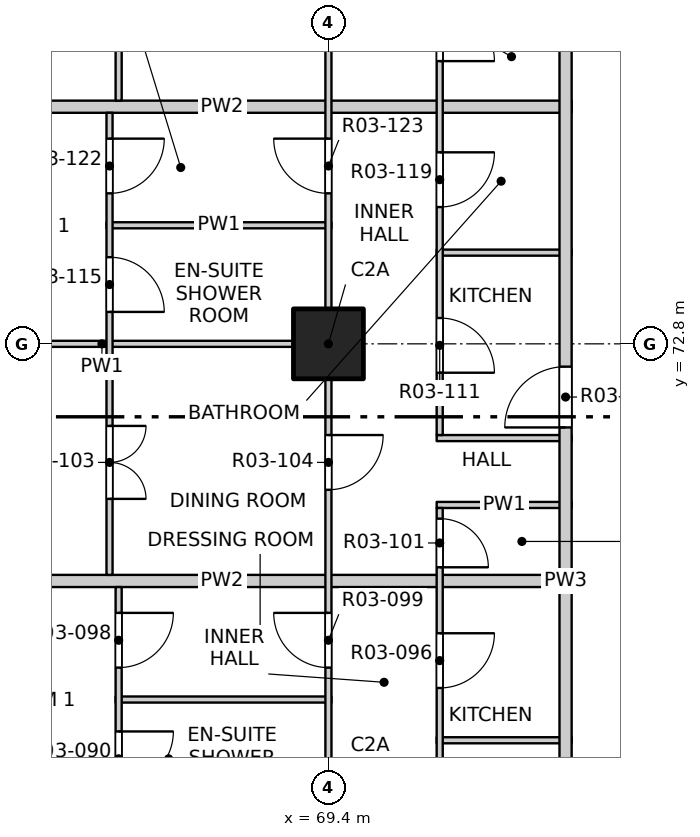
"""IFC4 building model, lengths in metres.
Left out: names, types, materials, properties, quantities, classifications, styles, units other than length and angle.
Written with IfcOpenShell. Run it as: python <this file> out.ifc"""

import sys

from ifc_helpers import new_model, si_unit, direction, frame, frame_2d, origin, origin_2d, place, context, subcontext, project, spatial, rectangle, extrude, element, fill, save


model = new_model("IFC4")
c1 = context("Model", 3, precision=1e-05, world=origin(), true_north=direction((0.0, 1.0)))
c2 = subcontext(c1, "Body", "Model", "MODEL_VIEW")
j1 = project(units=[si_unit("LENGTHUNIT", "METRE"), si_unit("PLANEANGLEUNIT", "RADIAN")], contexts=[c1])
p1 = place(None, origin())
s1 = spatial("IfcSite", under=j1, at=p1, CompositionType="ELEMENT")
p2 = place(p1, origin())
s2 = spatial("IfcBuilding", under=s1, at=p2, CompositionType="ELEMENT")
p3 = place(p2, frame((0.0, 0.0, 43.3)))
s3 = spatial("IfcBuildingStorey", under=s2, at=p3, CompositionType="ELEMENT", Elevation=43.3)
p4 = place(p3, frame((69.4, 72.8, -0.25), z_axis=(0.0, 0.0, 1.0), x_axis=(1.0, 0.0, 0.0)))
e1 = element("IfcColumn", 1, at=p4, inside=s3, PredefinedType="COLUMN", context=c2, shape_type="SweptSolid", body=[
    extrude(rectangle(XDim=1.15, YDim=1.15, at=origin_2d()), origin(), (0.0, 0.0, 1.0), 3.35),
])
p5 = place(p3, frame((71.18, 66.28, 0.0), z_axis=(0.0, 0.0, 1.0), x_axis=(1.0, 0.0, 0.0)))
e2 = element("IfcWall", 2, at=p5, inside=s3, PredefinedType="PARTITIONING", context=c2, shape_type="SweptSolid", body=[
    extrude(rectangle(XDim=2.22, YDim=0.1, at=frame_2d((1.11, 0.0))), origin(), (0.0, 0.0, 1.0), 3.1),
])
p6 = place(p3, frame((65.9, 66.95, 0.0), z_axis=(0.0, 0.0, 1.0), x_axis=(1.0, 0.0, 0.0)))
e3 = element("IfcWall", 3, at=p6, inside=s3, PredefinedType="PARTITIONING", context=c2, shape_type="SweptSolid", body=[
    extrude(rectangle(XDim=3.55, YDim=0.1, at=frame_2d((1.775, 0.0))), origin(), (0.0, 0.0, 1.0), 3.1),
])
p7 = place(p3, frame((61.9, 68.9, 0.0), z_axis=(0.0, 0.0, 1.0), x_axis=(1.0, 0.0, 0.0)))
e4 = element("IfcWall", 4, at=p7, inside=s3, PredefinedType="PARTITIONING", context=c2, shape_type="SweptSolid", body=[
    extrude(rectangle(XDim=11.5, YDim=0.2, at=frame_2d((5.75, 0.0))), origin(), (0.0, 0.0, 1.0), 3.1),
])
for number, where, z_axis, x_axis in (
    (5, (71.18, 70.15, 0.0), (0.0, 0.0, 1.0), (1.0, 0.0, 0.0)),
    (6, (71.18, 71.25, 0.0), (0.0, 0.0, 1.0), (1.0, 0.0, 0.0)),
):
    element("IfcWall", number, at=place(p3, frame(where, z_axis=z_axis, x_axis=x_axis)), inside=s3, PredefinedType="PARTITIONING", context=c2, shape_type="SweptSolid", body=[
        extrude(rectangle(XDim=2.22, YDim=0.1, at=frame_2d((1.11, 0.0))), origin(), (0.0, 0.0, 1.0), 3.1),
    ])
p8 = place(p3, frame((61.9, 72.8, 0.0), z_axis=(0.0, 0.0, 1.0), x_axis=(1.0, 0.0, 0.0)))
e7 = element("IfcWall", 7, at=p8, inside=s3, PredefinedType="PARTITIONING", context=c2, shape_type="SweptSolid", body=[
    extrude(rectangle(XDim=7.55, YDim=0.1, at=frame_2d((3.775, 0.0))), origin(), (0.0, 0.0, 1.0), 3.1),
])
p9 = place(p3, frame((71.18, 74.3, 0.0), z_axis=(0.0, 0.0, 1.0), x_axis=(1.0, 0.0, 0.0)))
e8 = element("IfcWall", 8, at=p9, inside=s3, PredefinedType="PARTITIONING", context=c2, shape_type="SweptSolid", body=[
    extrude(rectangle(XDim=2.22, YDim=0.1, at=frame_2d((1.11, 0.0))), origin(), (0.0, 0.0, 1.0), 3.1),
])
p10 = place(p3, frame((65.75, 74.75, 0.0), z_axis=(0.0, 0.0, 1.0), x_axis=(1.0, 0.0, 0.0)))
e9 = element("IfcWall", 9, at=p10, inside=s3, PredefinedType="PARTITIONING", context=c2, shape_type="SweptSolid", body=[
    extrude(rectangle(XDim=3.7, YDim=0.1, at=frame_2d((1.85, 0.0))), origin(), (0.0, 0.0, 1.0), 3.1),
])
p11 = place(p3, frame((61.9, 76.7, 0.0), z_axis=(0.0, 0.0, 1.0), x_axis=(1.0, 0.0, 0.0)))
e10 = element("IfcWall", 10, at=p11, inside=s3, PredefinedType="PARTITIONING", context=c2, shape_type="SweptSolid", body=[
    extrude(rectangle(XDim=11.5, YDim=0.2, at=frame_2d((5.75, 0.0))), origin(), (0.0, 0.0, 1.0), 3.1),
])
p12 = place(p3, frame((65.8, 69.0, 0.0), z_axis=(0.0, 0.0, 1.0), x_axis=(0.0, 1.0, 0.0)))
e11 = element("IfcWall", 11, at=p12, inside=s3, PredefinedType="PARTITIONING", context=c2, shape_type="SweptSolid", body=[
    extrude(rectangle(XDim=7.6, YDim=0.1, at=frame_2d((3.8, 0.0))), origin(), (0.0, 0.0, 1.0), 3.1),
])
p13 = place(p12, frame((1.25, 0.0, 0.0)))
e12 = element("IfcOpeningElement", 12, at=p13, cuts=e11, PredefinedType="OPENING", context=c2, shape_type="SweptSolid", body=[
    extrude(rectangle(XDim=1.2, YDim=2.1, at=frame_2d((0.6, 1.05))), frame((0.0, 0.06, 0.0), z_axis=(0.0, -1.0, 0.0), x_axis=(1.0, 0.0, 0.0)), (0.0, 0.0, 1.0), 0.12),
])
p14 = place(p12, frame((4.325, 0.0, 0.0)))
e13 = element("IfcOpeningElement", 13, at=p14, cuts=e11, PredefinedType="OPENING", context=c2, shape_type="SweptSolid", body=[
    extrude(rectangle(XDim=0.9, YDim=2.1, at=frame_2d((0.45, 1.05))), frame((0.0, 0.06, 0.0), z_axis=(0.0, -1.0, 0.0), x_axis=(1.0, 0.0, 0.0)), (0.0, 0.0, 1.0), 0.12),
])
p15 = place(p12, frame((6.275, 0.0, 0.0)))
e14 = element("IfcOpeningElement", 14, at=p15, cuts=e11, PredefinedType="OPENING", context=c2, shape_type="SweptSolid", body=[
    extrude(rectangle(XDim=0.9, YDim=2.1, at=frame_2d((0.45, 1.05))), frame((0.0, 0.06, 0.0), z_axis=(0.0, -1.0, 0.0), x_axis=(1.0, 0.0, 0.0)), (0.0, 0.0, 1.0), 0.12),
])
p16 = place(p3, frame((65.95, 61.2, 0.0), z_axis=(0.0, 0.0, 1.0), x_axis=(0.0, 1.0, 0.0)))
e15 = element("IfcWall", 15, at=p16, inside=s3, PredefinedType="PARTITIONING", context=c2, shape_type="SweptSolid", body=[
    extrude(rectangle(XDim=7.6, YDim=0.1, at=frame_2d((3.8, 0.0))), origin(), (0.0, 0.0, 1.0), 3.1),
])
p17 = place(p16, frame((1.25, 0.0, 0.0)))
e16 = element("IfcOpeningElement", 16, at=p17, cuts=e15, PredefinedType="OPENING", context=c2, shape_type="SweptSolid", body=[
    extrude(rectangle(XDim=1.2, YDim=2.1, at=frame_2d((0.6, 1.05))), frame((0.0, 0.06, 0.0), z_axis=(0.0, -1.0, 0.0), x_axis=(1.0, 0.0, 0.0)), (0.0, 0.0, 1.0), 0.12),
])
p18 = place(p16, frame((4.325, 0.0, 0.0)))
e17 = element("IfcOpeningElement", 17, at=p18, cuts=e15, PredefinedType="OPENING", context=c2, shape_type="SweptSolid", body=[
    extrude(rectangle(XDim=0.9, YDim=2.1, at=frame_2d((0.45, 1.05))), frame((0.0, 0.06, 0.0), z_axis=(0.0, -1.0, 0.0), x_axis=(1.0, 0.0, 0.0)), (0.0, 0.0, 1.0), 0.12),
])
p19 = place(p16, frame((6.275, 0.0, 0.0)))
e18 = element("IfcOpeningElement", 18, at=p19, cuts=e15, PredefinedType="OPENING", context=c2, shape_type="SweptSolid", body=[
    extrude(rectangle(XDim=0.9, YDim=2.1, at=frame_2d((0.45, 1.05))), frame((0.0, 0.06, 0.0), z_axis=(0.0, -1.0, 0.0), x_axis=(1.0, 0.0, 0.0)), (0.0, 0.0, 1.0), 0.12),
])
p20 = place(p3, frame((65.95, 76.8, 0.0), z_axis=(0.0, 0.0, 1.0), x_axis=(0.0, 1.0, 0.0)))
e19 = element("IfcWall", 19, at=p20, inside=s3, PredefinedType="PARTITIONING", context=c2, shape_type="SweptSolid", body=[
    extrude(rectangle(XDim=11.3, YDim=0.1, at=frame_2d((5.65, 0.0))), origin(), (0.0, 0.0, 1.0), 3.1),
])
p21 = place(p20, frame((1.25, 0.0, 0.0)))
e20 = element("IfcOpeningElement", 20, at=p21, cuts=e19, PredefinedType="OPENING", context=c2, shape_type="SweptSolid", body=[
    extrude(rectangle(XDim=1.2, YDim=2.1, at=frame_2d((0.6, 1.05))), frame((0.0, 0.06, 0.0), z_axis=(0.0, -1.0, 0.0), x_axis=(1.0, 0.0, 0.0)), (0.0, 0.0, 1.0), 0.12),
])
p22 = place(p20, frame((5.15, 0.0, 0.0)))
e21 = element("IfcOpeningElement", 21, at=p22, cuts=e19, PredefinedType="OPENING", context=c2, shape_type="SweptSolid", body=[
    extrude(rectangle(XDim=1.2, YDim=2.1, at=frame_2d((0.6, 1.05))), frame((0.0, 0.06, 0.0), z_axis=(0.0, -1.0, 0.0), x_axis=(1.0, 0.0, 0.0)), (0.0, 0.0, 1.0), 0.12),
])
p23 = place(p20, frame((9.05, 0.0, 0.0)))
e22 = element("IfcOpeningElement", 22, at=p23, cuts=e19, PredefinedType="OPENING", context=c2, shape_type="SweptSolid", body=[
    extrude(rectangle(XDim=1.2, YDim=2.1, at=frame_2d((0.6, 1.05))), frame((0.0, 0.06, 0.0), z_axis=(0.0, -1.0, 0.0), x_axis=(1.0, 0.0, 0.0)), (0.0, 0.0, 1.0), 0.12),
])
p24 = place(p3, frame((69.4, 41.9, 0.0), z_axis=(0.0, 0.0, 1.0), x_axis=(0.0, 1.0, 0.0)))
e23 = element("IfcWall", 23, at=p24, inside=s3, PredefinedType="PARTITIONING", context=c2, shape_type="SweptSolid", body=[
    extrude(rectangle(XDim=46.2, YDim=0.1, at=frame_2d((23.1, 0.0))), origin(), (0.0, 0.0, 1.0), 3.1),
])
p25 = place(p24, frame((1.2, 0.0, 0.0)))
e24 = element("IfcOpeningElement", 24, at=p25, cuts=e23, PredefinedType="OPENING", context=c2, shape_type="SweptSolid", body=[
    extrude(rectangle(XDim=0.9, YDim=2.1, at=frame_2d((0.45, 1.05))), frame((0.0, 0.06, 0.0), z_axis=(0.0, -1.0, 0.0), x_axis=(1.0, 0.0, 0.0)), (0.0, 0.0, 1.0), 0.12),
])
p26 = place(p24, frame((5.9, 0.0, 0.0)))
e25 = element("IfcOpeningElement", 25, at=p26, cuts=e23, PredefinedType="OPENING", context=c2, shape_type="SweptSolid", body=[
    extrude(rectangle(XDim=0.9, YDim=2.1, at=frame_2d((0.45, 1.05))), frame((0.0, 0.06, 0.0), z_axis=(0.0, -1.0, 0.0), x_axis=(1.0, 0.0, 0.0)), (0.0, 0.0, 1.0), 0.12),
])
p27 = place(p24, frame((9.0, 0.0, 0.0)))
e26 = element("IfcOpeningElement", 26, at=p27, cuts=e23, PredefinedType="OPENING", context=c2, shape_type="SweptSolid", body=[
    extrude(rectangle(XDim=0.9, YDim=2.1, at=frame_2d((0.45, 1.05))), frame((0.0, 0.06, 0.0), z_axis=(0.0, -1.0, 0.0), x_axis=(1.0, 0.0, 0.0)), (0.0, 0.0, 1.0), 0.12),
])
p28 = place(p24, frame((13.725, 0.0, 0.0)))
e27 = element("IfcOpeningElement", 27, at=p28, cuts=e23, PredefinedType="OPENING", context=c2, shape_type="SweptSolid", body=[
    extrude(rectangle(XDim=0.9, YDim=2.1, at=frame_2d((0.45, 1.05))), frame((0.0, 0.06, 0.0), z_axis=(0.0, -1.0, 0.0), x_axis=(1.0, 0.0, 0.0)), (0.0, 0.0, 1.0), 0.12),
])
p29 = place(p24, frame((17.775, 0.0, 0.0)))
e28 = element("IfcOpeningElement", 28, at=p29, cuts=e23, PredefinedType="OPENING", context=c2, shape_type="SweptSolid", body=[
    extrude(rectangle(XDim=0.9, YDim=2.1, at=frame_2d((0.45, 1.05))), frame((0.0, 0.06, 0.0), z_axis=(0.0, -1.0, 0.0), x_axis=(1.0, 0.0, 0.0)), (0.0, 0.0, 1.0), 0.12),
])
p30 = place(p24, frame((20.7, 0.0, 0.0)))
e29 = element("IfcOpeningElement", 29, at=p30, cuts=e23, PredefinedType="OPENING", context=c2, shape_type="SweptSolid", body=[
    extrude(rectangle(XDim=0.9, YDim=2.1, at=frame_2d((0.45, 1.05))), frame((0.0, 0.06, 0.0), z_axis=(0.0, -1.0, 0.0), x_axis=(1.0, 0.0, 0.0)), (0.0, 0.0, 1.0), 0.12),
])
p31 = place(p24, frame((25.575, 0.0, 0.0)))
e30 = element("IfcOpeningElement", 30, at=p31, cuts=e23, PredefinedType="OPENING", context=c2, shape_type="SweptSolid", body=[
    extrude(rectangle(XDim=0.9, YDim=2.1, at=frame_2d((0.45, 1.05))), frame((0.0, 0.06, 0.0), z_axis=(0.0, -1.0, 0.0), x_axis=(1.0, 0.0, 0.0)), (0.0, 0.0, 1.0), 0.12),
])
p32 = place(p24, frame((28.5, 0.0, 0.0)))
e31 = element("IfcOpeningElement", 31, at=p32, cuts=e23, PredefinedType="OPENING", context=c2, shape_type="SweptSolid", body=[
    extrude(rectangle(XDim=0.9, YDim=2.1, at=frame_2d((0.45, 1.05))), frame((0.0, 0.06, 0.0), z_axis=(0.0, -1.0, 0.0), x_axis=(1.0, 0.0, 0.0)), (0.0, 0.0, 1.0), 0.12),
])
p33 = place(p24, frame((33.375, 0.0, 0.0)))
e32 = element("IfcOpeningElement", 32, at=p33, cuts=e23, PredefinedType="OPENING", context=c2, shape_type="SweptSolid", body=[
    extrude(rectangle(XDim=0.9, YDim=2.1, at=frame_2d((0.45, 1.05))), frame((0.0, 0.06, 0.0), z_axis=(0.0, -1.0, 0.0), x_axis=(1.0, 0.0, 0.0)), (0.0, 0.0, 1.0), 0.12),
])
p34 = place(p24, frame((36.3, 0.0, 0.0)))
e33 = element("IfcOpeningElement", 33, at=p34, cuts=e23, PredefinedType="OPENING", context=c2, shape_type="SweptSolid", body=[
    extrude(rectangle(XDim=0.9, YDim=2.1, at=frame_2d((0.45, 1.05))), frame((0.0, 0.06, 0.0), z_axis=(0.0, -1.0, 0.0), x_axis=(1.0, 0.0, 0.0)), (0.0, 0.0, 1.0), 0.12),
])
p35 = place(p24, frame((40.2, 0.0, 0.0)))
e34 = element("IfcOpeningElement", 34, at=p35, cuts=e23, PredefinedType="OPENING", context=c2, shape_type="SweptSolid", body=[
    extrude(rectangle(XDim=0.9, YDim=2.1, at=frame_2d((0.45, 1.05))), frame((0.0, 0.06, 0.0), z_axis=(0.0, -1.0, 0.0), x_axis=(1.0, 0.0, 0.0)), (0.0, 0.0, 1.0), 0.12),
])
p36 = place(p24, frame((44.1, 0.0, 0.0)))
e35 = element("IfcOpeningElement", 35, at=p36, cuts=e23, PredefinedType="OPENING", context=c2, shape_type="SweptSolid", body=[
    extrude(rectangle(XDim=0.9, YDim=2.1, at=frame_2d((0.45, 1.05))), frame((0.0, 0.06, 0.0), z_axis=(0.0, -1.0, 0.0), x_axis=(1.0, 0.0, 0.0)), (0.0, 0.0, 1.0), 0.12),
])
p37 = place(p3, frame((71.23, 64.15, 0.0), z_axis=(0.0, 0.0, 1.0), x_axis=(0.0, 1.0, 0.0)))
e36 = element("IfcWall", 36, at=p37, inside=s3, PredefinedType="PARTITIONING", context=c2, shape_type="SweptSolid", body=[
    extrude(rectangle(XDim=5.95, YDim=0.1, at=frame_2d((2.975, 0.0))), origin(), (0.0, 0.0, 1.0), 3.1),
])
p38 = place(p37, frame((0.59, 0.0, 0.0)))
e37 = element("IfcOpeningElement", 37, at=p38, cuts=e36, PredefinedType="OPENING", context=c2, shape_type="SweptSolid", body=[
    extrude(rectangle(XDim=0.9, YDim=2.1, at=frame_2d((0.45, 1.05))), frame((0.0, 0.06, 0.0), z_axis=(0.0, -1.0, 0.0), x_axis=(1.0, 0.0, 0.0)), (0.0, 0.0, 1.0), 0.12),
])
p39 = place(p37, frame((2.99, 0.0, 0.0)))
e38 = element("IfcOpeningElement", 38, at=p39, cuts=e36, PredefinedType="OPENING", context=c2, shape_type="SweptSolid", body=[
    extrude(rectangle(XDim=0.9, YDim=2.1, at=frame_2d((0.45, 1.05))), frame((0.0, 0.06, 0.0), z_axis=(0.0, -1.0, 0.0), x_axis=(1.0, 0.0, 0.0)), (0.0, 0.0, 1.0), 0.12),
])
p40 = place(p37, frame((4.975, 0.0, 0.0)))
e39 = element("IfcOpeningElement", 39, at=p40, cuts=e36, PredefinedType="OPENING", context=c2, shape_type="SweptSolid", body=[
    extrude(rectangle(XDim=0.8, YDim=2.1, at=frame_2d((0.4, 1.05))), frame((0.0, 0.06, 0.0), z_axis=(0.0, -1.0, 0.0), x_axis=(1.0, 0.0, 0.0)), (0.0, 0.0, 1.0), 0.12),
])
p41 = place(p3, frame((71.23, 71.3, 0.0), z_axis=(0.0, 0.0, 1.0), x_axis=(0.0, 1.0, 0.0)))
e40 = element("IfcWall", 40, at=p41, inside=s3, PredefinedType="PARTITIONING", context=c2, shape_type="SweptSolid", body=[
    extrude(rectangle(XDim=10.95, YDim=0.1, at=frame_2d((5.475, 0.0))), origin(), (0.0, 0.0, 1.0), 3.1),
])
p42 = place(p41, frame((1.025, 0.0, 0.0)))
e41 = element("IfcOpeningElement", 41, at=p42, cuts=e40, PredefinedType="OPENING", context=c2, shape_type="SweptSolid", body=[
    extrude(rectangle(XDim=0.9, YDim=2.1, at=frame_2d((0.45, 1.05))), frame((0.0, 0.06, 0.0), z_axis=(0.0, -1.0, 0.0), x_axis=(1.0, 0.0, 0.0)), (0.0, 0.0, 1.0), 0.12),
])
p43 = place(p41, frame((3.75, 0.0, 0.0)))
e42 = element("IfcOpeningElement", 42, at=p43, cuts=e40, PredefinedType="OPENING", context=c2, shape_type="SweptSolid", body=[
    extrude(rectangle(XDim=0.9, YDim=2.1, at=frame_2d((0.45, 1.05))), frame((0.0, 0.06, 0.0), z_axis=(0.0, -1.0, 0.0), x_axis=(1.0, 0.0, 0.0)), (0.0, 0.0, 1.0), 0.12),
])
p44 = place(p41, frame((6.15, 0.0, 0.0)))
e43 = element("IfcOpeningElement", 43, at=p44, cuts=e40, PredefinedType="OPENING", context=c2, shape_type="SweptSolid", body=[
    extrude(rectangle(XDim=0.9, YDim=2.1, at=frame_2d((0.45, 1.05))), frame((0.0, 0.06, 0.0), z_axis=(0.0, -1.0, 0.0), x_axis=(1.0, 0.0, 0.0)), (0.0, 0.0, 1.0), 0.12),
])
p45 = place(p41, frame((8.95, 0.0, 0.0)))
e44 = element("IfcOpeningElement", 44, at=p45, cuts=e40, PredefinedType="OPENING", context=c2, shape_type="SweptSolid", body=[
    extrude(rectangle(XDim=0.9, YDim=2.1, at=frame_2d((0.45, 1.05))), frame((0.0, 0.06, 0.0), z_axis=(0.0, -1.0, 0.0), x_axis=(1.0, 0.0, 0.0)), (0.0, 0.0, 1.0), 0.12),
])
p46 = place(p3, frame((73.3, 53.4, 0.0), z_axis=(0.0, 0.0, 1.0), x_axis=(0.0, 1.0, 0.0)))
e45 = element("IfcWall", 45, at=p46, inside=s3, PredefinedType="PARTITIONING", context=c2, shape_type="SweptSolid", body=[
    extrude(rectangle(XDim=31.0, YDim=0.2, at=frame_2d((15.5, 0.0))), origin(), (0.0, 0.0, 1.0), 3.1),
])
p47 = place(p46, frame((5.775, 0.0, 0.0)))
e46 = element("IfcOpeningElement", 46, at=p47, cuts=e45, PredefinedType="OPENING", context=c2, shape_type="SweptSolid", body=[
    extrude(rectangle(XDim=1.0, YDim=2.1, at=frame_2d((0.5, 1.05))), frame((0.0, 0.11, 0.0), z_axis=(0.0, -1.0, 0.0), x_axis=(1.0, 0.0, 0.0)), (0.0, 0.0, 1.0), 0.22),
])
p48 = place(p46, frame((10.875, 0.0, 0.0)))
e47 = element("IfcOpeningElement", 47, at=p48, cuts=e45, PredefinedType="OPENING", context=c2, shape_type="SweptSolid", body=[
    extrude(rectangle(XDim=1.0, YDim=2.1, at=frame_2d((0.5, 1.05))), frame((0.0, 0.11, 0.0), z_axis=(0.0, -1.0, 0.0), x_axis=(1.0, 0.0, 0.0)), (0.0, 0.0, 1.0), 0.22),
])
p49 = place(p46, frame((18.025, 0.0, 0.0)))
e48 = element("IfcOpeningElement", 48, at=p49, cuts=e45, PredefinedType="OPENING", context=c2, shape_type="SweptSolid", body=[
    extrude(rectangle(XDim=1.0, YDim=2.1, at=frame_2d((0.5, 1.05))), frame((0.0, 0.11, 0.0), z_axis=(0.0, -1.0, 0.0), x_axis=(1.0, 0.0, 0.0)), (0.0, 0.0, 1.0), 0.22),
])
p50 = place(p46, frame((27.725, 0.0, 0.0)))
e49 = element("IfcOpeningElement", 49, at=p50, cuts=e45, PredefinedType="OPENING", context=c2, shape_type="SweptSolid", body=[
    extrude(rectangle(XDim=1.0, YDim=2.1, at=frame_2d((0.5, 1.05))), frame((0.0, 0.11, 0.0), z_axis=(0.0, -1.0, 0.0), x_axis=(1.0, 0.0, 0.0)), (0.0, 0.0, 1.0), 0.22),
])
p51 = place(p18, origin())
e50 = element("IfcDoor", 50, at=p51, inside=s3, OperationType="SINGLE_SWING_LEFT", PredefinedType="DOOR", context=c2, shape_type="SweptSolid", body=[
    extrude(rectangle(XDim=0.9, YDim=2.1, at=frame_2d((0.45, 1.05))), frame((0.0, 0.025, 0.0), z_axis=(0.0, -1.0, 0.0), x_axis=(1.0, 0.0, 0.0)), (0.0, 0.0, 1.0), 0.05),
])
fill(e17, e50)
p52 = place(p39, origin())
e51 = element("IfcDoor", 51, at=p52, inside=s3, OperationType="SINGLE_SWING_LEFT", PredefinedType="DOOR", context=c2, shape_type="SweptSolid", body=[
    extrude(rectangle(XDim=0.9, YDim=2.1, at=frame_2d((0.45, 1.05))), frame((0.0, 0.025, 0.0), z_axis=(0.0, -1.0, 0.0), x_axis=(1.0, 0.0, 0.0)), (0.0, 0.0, 1.0), 0.05),
])
fill(e38, e51)
p53 = place(p19, origin())
e52 = element("IfcDoor", 52, at=p53, inside=s3, OperationType="SINGLE_SWING_LEFT", PredefinedType="DOOR", context=c2, shape_type="SweptSolid", body=[
    extrude(rectangle(XDim=0.9, YDim=2.1, at=frame_2d((0.45, 1.05))), frame((0.0, 0.025, 0.0), z_axis=(0.0, -1.0, 0.0), x_axis=(1.0, 0.0, 0.0)), (0.0, 0.0, 1.0), 0.05),
])
fill(e18, e52)
p54 = place(p31, origin())
e53 = element("IfcDoor", 53, at=p54, inside=s3, OperationType="SINGLE_SWING_RIGHT", PredefinedType="DOOR", context=c2, shape_type="SweptSolid", body=[
    extrude(rectangle(XDim=0.9, YDim=2.1, at=frame_2d((0.45, 1.05))), frame((0.0, 0.025, 0.0), z_axis=(0.0, -1.0, 0.0), x_axis=(1.0, 0.0, 0.0)), (0.0, 0.0, 1.0), 0.05),
])
fill(e30, e53)
p55 = place(p40, origin())
e54 = element("IfcDoor", 54, at=p55, inside=s3, OperationType="SINGLE_SWING_RIGHT", PredefinedType="DOOR", context=c2, shape_type="SweptSolid", body=[
    extrude(rectangle(XDim=0.8, YDim=2.1, at=frame_2d((0.4, 1.05))), frame((0.0, 0.025, 0.0), z_axis=(0.0, -1.0, 0.0), x_axis=(1.0, 0.0, 0.0)), (0.0, 0.0, 1.0), 0.05),
])
fill(e39, e54)
p56 = place(p13, origin())
e55 = element("IfcDoor", 55, at=p56, inside=s3, OperationType="DOUBLE_DOOR_SINGLE_SWING", PredefinedType="DOOR", context=c2, shape_type="SweptSolid", body=[
    extrude(rectangle(XDim=1.2, YDim=2.1, at=frame_2d((0.6, 1.05))), frame((0.0, 0.025, 0.0), z_axis=(0.0, -1.0, 0.0), x_axis=(1.0, 0.0, 0.0)), (0.0, 0.0, 1.0), 0.05),
])
fill(e12, e55)
p57 = place(p32, origin())
e56 = element("IfcDoor", 56, at=p57, inside=s3, OperationType="SINGLE_SWING_LEFT", PredefinedType="DOOR", context=c2, shape_type="SweptSolid", body=[
    extrude(rectangle(XDim=0.9, YDim=2.1, at=frame_2d((0.45, 1.05))), frame((0.0, 0.025, 0.0), z_axis=(0.0, -1.0, 0.0), x_axis=(1.0, 0.0, 0.0)), (0.0, 0.0, 1.0), 0.05),
])
fill(e31, e56)
p58 = place(p49, origin())
e57 = element("IfcDoor", 57, at=p58, inside=s3, OperationType="SINGLE_SWING_RIGHT", PredefinedType="DOOR", context=c2, shape_type="SweptSolid", body=[
    extrude(rectangle(XDim=1.0, YDim=2.1, at=frame_2d((0.5, 1.05))), frame((0.0, 0.025, 0.0), z_axis=(0.0, -1.0, 0.0), x_axis=(1.0, 0.0, 0.0)), (0.0, 0.0, 1.0), 0.05),
])
fill(e48, e57)
p59 = place(p42, origin())
e58 = element("IfcDoor", 58, at=p59, inside=s3, OperationType="SINGLE_SWING_RIGHT", PredefinedType="DOOR", context=c2, shape_type="SweptSolid", body=[
    extrude(rectangle(XDim=0.9, YDim=2.1, at=frame_2d((0.45, 1.05))), frame((0.0, 0.025, 0.0), z_axis=(0.0, -1.0, 0.0), x_axis=(1.0, 0.0, 0.0)), (0.0, 0.0, 1.0), 0.05),
])
fill(e41, e58)
p60 = place(p14, origin())
e59 = element("IfcDoor", 59, at=p60, inside=s3, OperationType="SINGLE_SWING_RIGHT", PredefinedType="DOOR", context=c2, shape_type="SweptSolid", body=[
    extrude(rectangle(XDim=0.9, YDim=2.1, at=frame_2d((0.45, 1.05))), frame((0.0, 0.025, 0.0), z_axis=(0.0, -1.0, 0.0), x_axis=(1.0, 0.0, 0.0)), (0.0, 0.0, 1.0), 0.05),
])
fill(e13, e59)
p61 = place(p43, origin())
e60 = element("IfcDoor", 60, at=p61, inside=s3, OperationType="SINGLE_SWING_LEFT", PredefinedType="DOOR", context=c2, shape_type="SweptSolid", body=[
    extrude(rectangle(XDim=0.9, YDim=2.1, at=frame_2d((0.45, 1.05))), frame((0.0, 0.025, 0.0), z_axis=(0.0, -1.0, 0.0), x_axis=(1.0, 0.0, 0.0)), (0.0, 0.0, 1.0), 0.05),
])
fill(e42, e60)
p62 = place(p15, origin())
e61 = element("IfcDoor", 61, at=p62, inside=s3, OperationType="SINGLE_SWING_LEFT", PredefinedType="DOOR", context=c2, shape_type="SweptSolid", body=[
    extrude(rectangle(XDim=0.9, YDim=2.1, at=frame_2d((0.45, 1.05))), frame((0.0, 0.025, 0.0), z_axis=(0.0, -1.0, 0.0), x_axis=(1.0, 0.0, 0.0)), (0.0, 0.0, 1.0), 0.05),
])
fill(e14, e61)
p63 = place(p33, origin())
e62 = element("IfcDoor", 62, at=p63, inside=s3, OperationType="SINGLE_SWING_RIGHT", PredefinedType="DOOR", context=c2, shape_type="SweptSolid", body=[
    extrude(rectangle(XDim=0.9, YDim=2.1, at=frame_2d((0.45, 1.05))), frame((0.0, 0.025, 0.0), z_axis=(0.0, -1.0, 0.0), x_axis=(1.0, 0.0, 0.0)), (0.0, 0.0, 1.0), 0.05),
])
fill(e32, e62)
p64 = place(p44, origin())
e63 = element("IfcDoor", 63, at=p64, inside=s3, OperationType="SINGLE_SWING_RIGHT", PredefinedType="DOOR", context=c2, shape_type="SweptSolid", body=[
    extrude(rectangle(XDim=0.9, YDim=2.1, at=frame_2d((0.45, 1.05))), frame((0.0, 0.025, 0.0), z_axis=(0.0, -1.0, 0.0), x_axis=(1.0, 0.0, 0.0)), (0.0, 0.0, 1.0), 0.05),
])
fill(e43, e63)
save(model, sys.argv[1])
